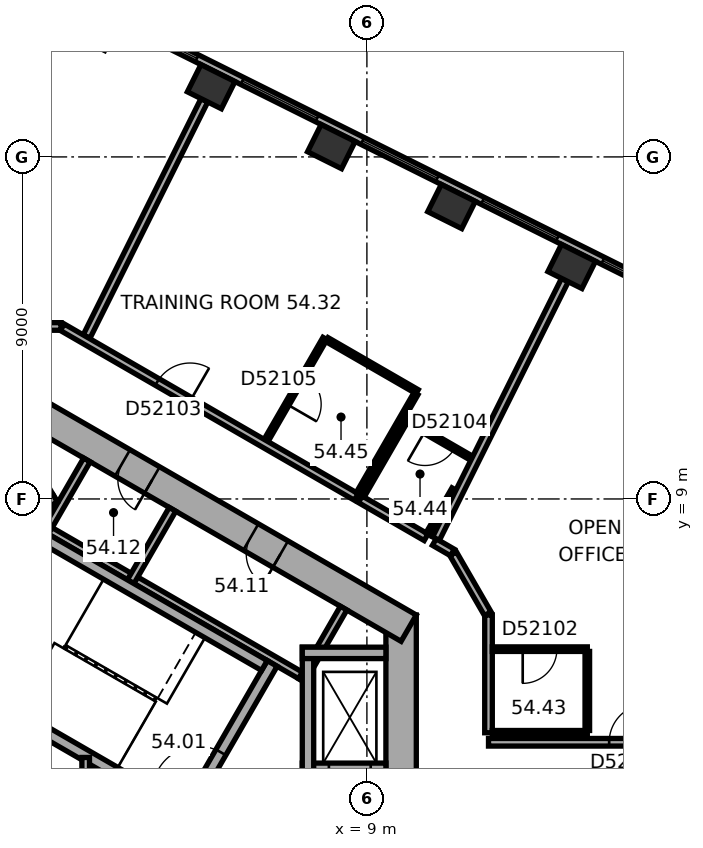
"""IFC4 building model, lengths in metres.
Left out: names, types, materials, properties, quantities, classifications, styles, units other than length and angle.
Written with IfcOpenShell. Run it as: python <this file> out.ifc"""

import sys

from ifc_helpers import new_model, si_unit, direction, frame, frame_2d, origin, origin_2d, place, context, subcontext, project, spatial, rectangle, extrude, element, fill, save


model = new_model("IFC4")
c1 = context("Model", 3, precision=1e-05, world=origin(), true_north=direction((0.0, 1.0)))
c2 = subcontext(c1, "Body", "Model", "MODEL_VIEW")
j1 = project(units=[si_unit("LENGTHUNIT", "METRE"), si_unit("PLANEANGLEUNIT", "RADIAN")], contexts=[c1])
p1 = place(None, origin())
s1 = spatial("IfcSite", under=j1, at=p1, CompositionType="ELEMENT")
p2 = place(p1, origin())
s2 = spatial("IfcBuilding", under=s1, at=p2, CompositionType="ELEMENT")
p3 = place(p2, frame((0.0, 0.0, 221.7)))
s3 = spatial("IfcBuildingStorey", under=s2, at=p3, CompositionType="ELEMENT", Elevation=221.7)
for number, where, z_axis, x_axis in (
    (1, (14.389, 15.118, 0.0), (0.0, 0.0, 1.0), (-0.895, 0.446, 0.0)),
    (2, (11.227, 16.695, 0.0), (0.0, 0.0, 1.0), (-0.895, 0.446, 0.0)),
    (3, (8.064, 18.271, 0.0), (0.0, 0.0, 1.0), (-0.895, 0.446, 0.0)),
    (4, (4.902, 19.848, 0.0), (0.0, 0.0, 1.0), (-0.895, 0.446, 0.0)),
):
    element("IfcColumn", number, at=place(p3, frame(where, z_axis=z_axis, x_axis=x_axis)), inside=s3, PredefinedType="COLUMN", context=c2, shape_type="SweptSolid", body=[
        extrude(rectangle(XDim=1.0, YDim=0.8, at=origin_2d()), origin(), (0.0, 0.0, 1.0), 3.7),
    ])
p4 = place(p3, frame((9.9, -5.947, 0.0), z_axis=(0.0, 0.0, 1.0), x_axis=(0.0, 1.0, 0.0)))
e5 = element("IfcWall", 5, at=p4, inside=s3, PredefinedType="SHEAR", context=c2, shape_type="SweptSolid", body=[
    extrude(rectangle(XDim=11.894, YDim=0.8, at=frame_2d((5.947, 0.0))), origin(), (0.0, 0.0, 1.0), 3.7),
])
p5 = place(p4, frame((6.147, 0.0, 0.0)))
e6 = element("IfcOpeningElement", 6, at=p5, cuts=e5, PredefinedType="OPENING", context=c2, shape_type="SweptSolid", body=[
    extrude(rectangle(XDim=1.5, YDim=2.1, at=frame_2d((0.75, 1.05))), frame((0.0, 0.41, 0.0), z_axis=(0.0, -1.0, 0.0), x_axis=(1.0, 0.0, 0.0)), (0.0, 0.0, 1.0), 0.82),
])
p6 = place(p4, frame((2.997, 0.0, 0.0)))
e7 = element("IfcOpeningElement", 7, at=p6, cuts=e5, PredefinedType="OPENING", context=c2, shape_type="SweptSolid", body=[
    extrude(rectangle(XDim=0.9, YDim=2.1, at=frame_2d((0.45, 1.05))), frame((0.0, 0.41, 0.0), z_axis=(0.0, -1.0, 0.0), x_axis=(1.0, 0.0, 0.0)), (0.0, 0.0, 1.0), 0.82),
])
p7 = place(p3, frame((10.1, 5.6, 0.0), z_axis=(0.0, 0.0, 1.0), x_axis=(-0.866023897231, 0.500002609418, 0.0)))
e8 = element("IfcWall", 8, at=p7, inside=s3, PredefinedType="SHEAR", context=c2, shape_type="SweptSolid", body=[
    extrude(rectangle(XDim=11.894, YDim=0.8, at=frame_2d((5.947, 0.0))), origin(), (0.0, 0.0, 1.0), 3.7),
])
p8 = place(p7, frame((3.897, 0.0, 0.0)))
e9 = element("IfcOpeningElement", 9, at=p8, cuts=e8, PredefinedType="OPENING", context=c2, shape_type="SweptSolid", body=[
    extrude(rectangle(XDim=0.9, YDim=2.1, at=frame_2d((0.45, 1.05))), frame((0.0, 0.41, 0.0), z_axis=(0.0, -1.0, 0.0), x_axis=(1.0, 0.0, 0.0)), (0.0, 0.0, 1.0), 0.82),
])
p9 = place(p7, frame((7.797, 0.0, 0.0)))
e10 = element("IfcOpeningElement", 10, at=p9, cuts=e8, PredefinedType="OPENING", context=c2, shape_type="SweptSolid", body=[
    extrude(rectangle(XDim=0.9, YDim=2.1, at=frame_2d((0.45, 1.05))), frame((0.0, 0.41, 0.0), z_axis=(0.0, -1.0, 0.0), x_axis=(1.0, 0.0, 0.0)), (0.0, 0.0, 1.0), 0.82),
])
p10 = place(p3, frame((18.299, 13.727, 0.0), z_axis=(0.0, 0.0, 1.0), x_axis=(-0.894934554817, 0.44619742558, 0.0)))
e11 = element("IfcWall", 11, at=p10, inside=s3, PredefinedType="STANDARD", context=c2, shape_type="SweptSolid", body=[
    extrude(rectangle(XDim=18.841, YDim=0.2, at=frame_2d((9.421, 0.0))), origin(), (0.0, 0.0, 1.0), 3.7),
])
p11 = place(p10, frame((1.253, 0.0, 0.9)))
e12 = element("IfcOpeningElement", 12, at=p11, cuts=e11, PredefinedType="OPENING", context=c2, shape_type="SweptSolid", body=[
    extrude(rectangle(XDim=2.2, YDim=2.0, at=frame_2d((1.1, 1.0))), frame((0.0, 0.11, 0.0), z_axis=(0.0, -1.0, 0.0), x_axis=(1.0, 0.0, 0.0)), (0.0, 0.0, 1.0), 0.22),
])
p12 = place(p10, frame((4.786, 0.0, 0.9)))
e13 = element("IfcOpeningElement", 13, at=p12, cuts=e11, PredefinedType="OPENING", context=c2, shape_type="SweptSolid", body=[
    extrude(rectangle(XDim=2.2, YDim=2.0, at=frame_2d((1.1, 1.0))), frame((0.0, 0.11, 0.0), z_axis=(0.0, -1.0, 0.0), x_axis=(1.0, 0.0, 0.0)), (0.0, 0.0, 1.0), 0.22),
])
p13 = place(p10, frame((8.32, 0.0, 0.9)))
e14 = element("IfcOpeningElement", 14, at=p13, cuts=e11, PredefinedType="OPENING", context=c2, shape_type="SweptSolid", body=[
    extrude(rectangle(XDim=2.2, YDim=2.0, at=frame_2d((1.1, 1.0))), frame((0.0, 0.11, 0.0), z_axis=(0.0, -1.0, 0.0), x_axis=(1.0, 0.0, 0.0)), (0.0, 0.0, 1.0), 0.22),
])
p14 = place(p10, frame((11.854, 0.0, 0.9)))
e15 = element("IfcOpeningElement", 15, at=p14, cuts=e11, PredefinedType="OPENING", context=c2, shape_type="SweptSolid", body=[
    extrude(rectangle(XDim=2.2, YDim=2.0, at=frame_2d((1.1, 1.0))), frame((0.0, 0.11, 0.0), z_axis=(0.0, -1.0, 0.0), x_axis=(1.0, 0.0, 0.0)), (0.0, 0.0, 1.0), 0.22),
])
p15 = place(p10, frame((15.387, 0.0, 0.9)))
e16 = element("IfcOpeningElement", 16, at=p15, cuts=e11, PredefinedType="OPENING", context=c2, shape_type="SweptSolid", body=[
    extrude(rectangle(XDim=2.2, YDim=2.0, at=frame_2d((1.1, 1.0))), frame((0.0, 0.11, 0.0), z_axis=(0.0, -1.0, 0.0), x_axis=(1.0, 0.0, 0.0)), (0.0, 0.0, 1.0), 0.22),
])
p16 = place(p3, frame((7.424, 4.259, 0.0), z_axis=(0.0, 0.0, 1.0), x_axis=(-0.866026010844, 0.49999894854, 0.0)))
e17 = element("IfcWall", 17, at=p16, inside=s3, PredefinedType="PARTITIONING", context=c2, shape_type="SweptSolid", body=[
    extrude(rectangle(XDim=8.0, YDim=0.2, at=frame_2d((4.0, 0.0))), origin(), (0.0, 0.0, 1.0), 3.42),
])
for number, where, z_axis, x_axis in (
    (18, (7.287, 4.222, 0.0), (0.0, 0.0, 1.0), (0.5, 0.866, 0.0)),
    (19, (2.784, 6.822, 0.0), (0.0, 0.0, 1.0), (0.5, 0.866, 0.0)),
    (20, (0.532, 8.122, 0.0), (0.0, 0.0, 1.0), (0.5, 0.866, 0.0)),
):
    element("IfcWall", number, at=place(p3, frame(where, z_axis=z_axis, x_axis=x_axis)), inside=s3, PredefinedType="PARTITIONING", context=c2, shape_type="SweptSolid", body=[
        extrude(rectangle(XDim=2.2, YDim=0.2, at=frame_2d((1.1, 0.0))), origin(), (0.0, 0.0, 1.0), 3.42),
    ])
p17 = place(p3, frame((0.803, 9.009, 0.0), z_axis=(0.0, 0.0, 1.0), x_axis=(-0.866028230842, -0.499995103361, 0.0)))
e21 = element("IfcWall", 21, at=p17, inside=s3, PredefinedType="PARTITIONING", context=c2, shape_type="SweptSolid", body=[
    extrude(rectangle(XDim=5.4, YDim=0.2, at=frame_2d((2.7, 0.0))), origin(), (0.0, 0.0, 1.0), 3.42),
])
p18 = place(p3, frame((0.767, 8.872, 0.0), z_axis=(0.0, 0.0, 1.0), x_axis=(-0.499994660107, 0.866028486751, 0.0)))
e22 = element("IfcWall", 22, at=p18, inside=s3, PredefinedType="PARTITIONING", context=c2, shape_type="SweptSolid", body=[
    extrude(rectangle(XDim=2.2, YDim=0.2, at=frame_2d((1.1, 0.0))), origin(), (0.0, 0.0, 1.0), 3.42),
])
p19 = place(p3, frame((4.158, 0.602, 0.0), z_axis=(0.0, 0.0, 1.0), x_axis=(0.499977259774, 0.866038532462, 0.0)))
e23 = element("IfcWall", 23, at=p19, inside=s3, PredefinedType="SHEAR", context=c2, shape_type="SweptSolid", body=[
    extrude(rectangle(XDim=4.7, YDim=0.3, at=frame_2d((2.35, 0.0))), origin(), (0.0, 0.0, 1.0), 3.42),
])
p20 = place(p19, frame((0.8, 0.0, 0.0)))
e24 = element("IfcOpeningElement", 24, at=p20, cuts=e23, PredefinedType="OPENING", context=c2, shape_type="SweptSolid", body=[
    extrude(rectangle(XDim=1.2, YDim=2.1, at=frame_2d((0.6, 1.05))), frame((0.0, 0.16, 0.0), z_axis=(0.0, -1.0, 0.0), x_axis=(1.0, 0.0, 0.0)), (0.0, 0.0, 1.0), 0.32),
])
for number, where, z_axis, x_axis in (
    (25, (4.103, 0.807, 0.0), (0.0, 0.0, 1.0), (-0.866, 0.5, 0.0)),
    (26, (6.303, 4.617, 0.0), (0.0, 0.0, 1.0), (-0.866, 0.5, 0.0)),
):
    element("IfcWall", number, at=place(p3, frame(where, z_axis=z_axis, x_axis=x_axis)), inside=s3, PredefinedType="SHEAR", context=c2, shape_type="SweptSolid", body=[
        extrude(rectangle(XDim=7.06, YDim=0.3, at=frame_2d((3.53, 0.0))), origin(), (0.0, 0.0, 1.0), 3.42),
    ])
p21 = place(p3, frame((7.3, 1.9, 0.0), z_axis=(0.0, 0.0, 1.0), x_axis=(1.0, 0.0, 0.0)))
e27 = element("IfcWall", 27, at=p21, inside=s3, PredefinedType="SHEAR", context=c2, shape_type="SweptSolid", body=[
    extrude(rectangle(XDim=2.2, YDim=0.3, at=frame_2d((1.1, 0.0))), origin(), (0.0, 0.0, 1.0), 3.42),
])
p22 = place(p21, frame((0.7, 0.0, 0.0)))
e28 = element("IfcOpeningElement", 28, at=p22, cuts=e27, PredefinedType="OPENING", context=c2, shape_type="SweptSolid", body=[
    extrude(rectangle(XDim=1.1, YDim=2.1, at=frame_2d((0.55, 1.05))), frame((0.0, 0.16, 0.0), z_axis=(0.0, -1.0, 0.0), x_axis=(1.0, 0.0, 0.0)), (0.0, 0.0, 1.0), 0.32),
])
p23 = place(p3, frame((7.45, 1.75, 0.0), z_axis=(0.0, 0.0, 1.0), x_axis=(0.0, 1.0, 0.0)))
e29 = element("IfcWall", 29, at=p23, inside=s3, PredefinedType="SHEAR", context=c2, shape_type="SweptSolid", body=[
    extrude(rectangle(XDim=3.35, YDim=0.3, at=frame_2d((1.675, 0.0))), origin(), (0.0, 0.0, 1.0), 3.42),
])
p24 = place(p3, frame((7.3, 4.95, 0.0), z_axis=(0.0, 0.0, 1.0), x_axis=(1.0, 0.0, 0.0)))
e30 = element("IfcWall", 30, at=p24, inside=s3, PredefinedType="SHEAR", context=c2, shape_type="SweptSolid", body=[
    extrude(rectangle(XDim=2.2, YDim=0.3, at=frame_2d((1.1, 0.0))), origin(), (0.0, 0.0, 1.0), 3.42),
])
p25 = place(p3, frame((1.6, -2.198, 0.0), z_axis=(0.0, 0.0, 1.0), x_axis=(0.0, 1.0, 0.0)))
e31 = element("IfcWall", 31, at=p25, inside=s3, PredefinedType="PARTITIONING", context=c2, shape_type="SweptSolid", body=[
    extrude(rectangle(XDim=4.397, YDim=0.2, at=frame_2d((2.198, 0.0))), origin(), (0.0, 0.0, 1.0), 3.42),
])
p26 = place(p3, frame((0.95, 13.539, 0.0), z_axis=(0.0, 0.0, 1.0), x_axis=(-1.0, 0.0, 0.0)))
e32 = element("IfcWall", 32, at=p26, inside=s3, PredefinedType="PARTITIONING", context=c2, shape_type="SweptSolid", body=[
    extrude(rectangle(XDim=1.9, YDim=0.2, at=frame_2d((0.95, 0.0))), origin(), (0.0, 0.0, 1.0), 3.42),
])
p27 = place(p3, frame((4.723, 19.49, 0.0), z_axis=(0.0, 0.0, 1.0), x_axis=(-0.446186614574, -0.894939944898, 0.0)))
e33 = element("IfcWall", 33, at=p27, inside=s3, PredefinedType="PARTITIONING", context=c2, shape_type="SweptSolid", body=[
    extrude(rectangle(XDim=6.944, YDim=0.2, at=frame_2d((3.472, 0.0))), origin(), (0.0, 0.0, 1.0), 2.87),
])
p28 = place(p3, frame((6.347, 10.539, 0.0), z_axis=(0.0, 0.0, 1.0), x_axis=(0.499933790963, 0.866063626216, 0.0)))
e34 = element("IfcWall", 34, at=p28, inside=s3, PredefinedType="PARTITIONING", context=c2, shape_type="SweptSolid", body=[
    extrude(rectangle(XDim=3.1, YDim=0.12, at=frame_2d((1.55, 0.0))), origin(), (0.0, 0.0, 1.0), 3.42),
])
p29 = place(p28, frame((1.1, 0.0, 0.0)))
e35 = element("IfcOpeningElement", 35, at=p29, cuts=e34, PredefinedType="OPENING", context=c2, shape_type="SweptSolid", body=[
    extrude(rectangle(XDim=0.9, YDim=2.1, at=frame_2d((0.45, 1.05))), frame((0.0, 0.07, 0.0), z_axis=(0.0, -1.0, 0.0), x_axis=(1.0, 0.0, 0.0)), (0.0, 0.0, 1.0), 0.14),
])
p30 = place(p3, frame((7.948, 13.193, 0.0), z_axis=(0.0, 0.0, 1.0), x_axis=(0.866019409031, -0.500010383074, 0.0)))
e36 = element("IfcWall", 36, at=p30, inside=s3, PredefinedType="PARTITIONING", context=c2, shape_type="SweptSolid", body=[
    extrude(rectangle(XDim=2.74, YDim=0.12, at=frame_2d((1.37, 0.0))), origin(), (0.0, 0.0, 1.0), 3.42),
])
p31 = place(p3, frame((8.721, 9.052, 0.0), z_axis=(0.0, 0.0, 1.0), x_axis=(-0.866028125821, 0.499995285264, 0.0)))
e37 = element("IfcWall", 37, at=p31, inside=s3, PredefinedType="PARTITIONING", context=c2, shape_type="SweptSolid", body=[
    extrude(rectangle(XDim=8.934, YDim=0.2, at=frame_2d((4.467, 0.0))), origin(), (0.0, 0.0, 1.0), 3.42),
])
p32 = place(p31, frame((5.05, 0.0, 0.0)))
e38 = element("IfcOpeningElement", 38, at=p32, cuts=e37, PredefinedType="OPENING", context=c2, shape_type="SweptSolid", body=[
    extrude(rectangle(XDim=1.0, YDim=2.1, at=frame_2d((0.5, 1.05))), frame((0.0, 0.11, 0.0), z_axis=(0.0, -1.0, 0.0), x_axis=(1.0, 0.0, 0.0)), (0.0, 0.0, 1.0), 0.22),
])
p33 = place(p3, frame((8.875, 9.079, 0.0), z_axis=(0.0, 0.0, 1.0), x_axis=(0.499998129301, 0.86602648383, 0.0)))
e39 = element("IfcWall", 39, at=p33, inside=s3, PredefinedType="PARTITIONING", context=c2, shape_type="SweptSolid", body=[
    extrude(rectangle(XDim=2.3, YDim=0.12, at=frame_2d((1.15, 0.0))), origin(), (0.0, 0.0, 1.0), 3.42),
])
p34 = place(p3, frame((10.077, 11.04, 0.0), z_axis=(0.0, 0.0, 1.0), x_axis=(0.866043088465, -0.499969367985, 0.0)))
e40 = element("IfcWall", 40, at=p34, inside=s3, PredefinedType="PARTITIONING", context=c2, shape_type="SweptSolid", body=[
    extrude(rectangle(XDim=1.94, YDim=0.12, at=frame_2d((0.97, 0.0))), origin(), (0.0, 0.0, 1.0), 3.42),
])
p35 = place(p34, frame((0.52, 0.0, 0.0)))
e41 = element("IfcOpeningElement", 41, at=p35, cuts=e40, PredefinedType="OPENING", context=c2, shape_type="SweptSolid", body=[
    extrude(rectangle(XDim=0.9, YDim=2.1, at=frame_2d((0.45, 1.05))), frame((0.0, 0.07, 0.0), z_axis=(0.0, -1.0, 0.0), x_axis=(1.0, 0.0, 0.0)), (0.0, 0.0, 1.0), 0.14),
])
p36 = place(p3, frame((10.292, 11.771, 0.0), z_axis=(0.0, 0.0, 1.0), x_axis=(-0.500026023896, -0.86601037836, 0.0)))
e42 = element("IfcWall", 42, at=p36, inside=s3, PredefinedType="PARTITIONING", context=c2, shape_type="SweptSolid", body=[
    extrude(rectangle(XDim=3.04, YDim=0.12, at=frame_2d((1.52, 0.0))), origin(), (0.0, 0.0, 1.0), 3.42),
])
p37 = place(p3, frame((10.558, 7.992, 0.0), z_axis=(0.0, 0.0, 1.0), x_axis=(-0.866041268327, 0.499972520799, 0.0)))
e43 = element("IfcWall", 43, at=p37, inside=s3, PredefinedType="PARTITIONING", context=c2, shape_type="SweptSolid", body=[
    extrude(rectangle(XDim=2.0, YDim=0.2, at=frame_2d((1.0, 0.0))), origin(), (0.0, 0.0, 1.0), 3.42),
])
p38 = place(p3, frame((11.25, 7.592, 0.0), z_axis=(0.0, 0.0, 1.0), x_axis=(-0.865993292597, 0.500055614084, 0.0)))
e44 = element("IfcWall", 44, at=p38, inside=s3, PredefinedType="PARTITIONING", context=c2, shape_type="SweptSolid", body=[
    extrude(rectangle(XDim=0.55, YDim=0.2, at=frame_2d((0.275, 0.0))), origin(), (0.0, 0.0, 1.0), 3.42),
])
p39 = place(p3, frame((11.291, 9.263, 0.0), z_axis=(0.0, 0.0, 1.0), x_axis=(-0.500036664704, -0.866004234373, 0.0)))
e45 = element("IfcWall", 45, at=p39, inside=s3, PredefinedType="PARTITIONING", context=c2, shape_type="SweptSolid", body=[
    extrude(rectangle(XDim=1.368, YDim=0.12, at=frame_2d((0.684, 0.0))), origin(), (0.0, 0.0, 1.0), 3.42),
])
p40 = place(p3, frame((12.18, 5.981, 0.0), z_axis=(0.0, 0.0, 1.0), x_axis=(-0.499904359745, 0.86608061467, 0.0)))
e46 = element("IfcWall", 46, at=p40, inside=s3, PredefinedType="PARTITIONING", context=c2, shape_type="SweptSolid", body=[
    extrude(rectangle(XDim=1.82, YDim=0.2, at=frame_2d((0.91, 0.0))), origin(), (0.0, 0.0, 1.0), 3.42),
])
p41 = place(p3, frame((12.2, 2.848, 0.0), z_axis=(0.0, 0.0, 1.0), x_axis=(0.0, 1.0, 0.0)))
e47 = element("IfcWall", 47, at=p41, inside=s3, PredefinedType="PARTITIONING", context=c2, shape_type="SweptSolid", body=[
    extrude(rectangle(XDim=3.099, YDim=0.2, at=frame_2d((1.549, 0.0))), origin(), (0.0, 0.0, 1.0), 3.42),
])
p42 = place(p3, frame((12.3, 5.048, 0.0), z_axis=(0.0, 0.0, 1.0), x_axis=(1.0, 0.0, 0.0)))
e48 = element("IfcWall", 48, at=p42, inside=s3, PredefinedType="PARTITIONING", context=c2, shape_type="SweptSolid", body=[
    extrude(rectangle(XDim=2.5, YDim=0.12, at=frame_2d((1.25, 0.0))), origin(), (0.0, 0.0, 1.0), 3.42),
])
p43 = place(p42, frame((0.8, 0.0, 0.0)))
e49 = element("IfcOpeningElement", 49, at=p43, cuts=e48, PredefinedType="OPENING", context=c2, shape_type="SweptSolid", body=[
    extrude(rectangle(XDim=0.9, YDim=2.1, at=frame_2d((0.45, 1.05))), frame((0.0, 0.07, 0.0), z_axis=(0.0, -1.0, 0.0), x_axis=(1.0, 0.0, 0.0)), (0.0, 0.0, 1.0), 0.14),
])
p44 = place(p3, frame((14.211, 14.76, 0.0), z_axis=(0.0, 0.0, 1.0), x_axis=(-0.446198490295, -0.89493402397, 0.0)))
e50 = element("IfcWall", 50, at=p44, inside=s3, PredefinedType="PARTITIONING", context=c2, shape_type="SweptSolid", body=[
    extrude(rectangle(XDim=7.602, YDim=0.2, at=frame_2d((3.801, 0.0))), origin(), (0.0, 0.0, 1.0), 3.42),
])
p45 = place(p3, frame((14.8, 2.848, 0.0), z_axis=(0.0, 0.0, 1.0), x_axis=(-1.0, 0.0, 0.0)))
e51 = element("IfcWall", 51, at=p45, inside=s3, PredefinedType="PARTITIONING", context=c2, shape_type="SweptSolid", body=[
    extrude(rectangle(XDim=2.5, YDim=0.12, at=frame_2d((1.25, 0.0))), origin(), (0.0, 0.0, 1.0), 3.42),
])
p46 = place(p3, frame((14.8, 4.988, 0.0), z_axis=(0.0, 0.0, 1.0), x_axis=(0.0, -1.0, 0.0)))
e52 = element("IfcWall", 52, at=p46, inside=s3, PredefinedType="PARTITIONING", context=c2, shape_type="SweptSolid", body=[
    extrude(rectangle(XDim=2.08, YDim=0.12, at=frame_2d((1.04, 0.0))), origin(), (0.0, 0.0, 1.0), 3.42),
])
p47 = place(p3, frame((19.55, 2.598, 0.0), z_axis=(0.0, 0.0, 1.0), x_axis=(-1.0, 0.0, 0.0)))
e53 = element("IfcWall", 53, at=p47, inside=s3, PredefinedType="PARTITIONING", context=c2, shape_type="SweptSolid", body=[
    extrude(rectangle(XDim=7.35, YDim=0.2, at=frame_2d((3.675, 0.0))), origin(), (0.0, 0.0, 1.0), 3.42),
])
p48 = place(p47, frame((3.175, 0.0, 0.0)))
e54 = element("IfcOpeningElement", 54, at=p48, cuts=e53, PredefinedType="OPENING", context=c2, shape_type="SweptSolid", body=[
    extrude(rectangle(XDim=1.0, YDim=2.1, at=frame_2d((0.5, 1.05))), frame((0.0, 0.11, 0.0), z_axis=(0.0, -1.0, 0.0), x_axis=(1.0, 0.0, 0.0)), (0.0, 0.0, 1.0), 0.22),
])
p49 = place(p11, origin())
e55 = element("IfcWindow", 55, at=p49, inside=s3, PartitioningType="SINGLE_PANEL", PredefinedType="WINDOW", context=c2, shape_type="SweptSolid", body=[
    extrude(rectangle(XDim=2.2, YDim=2.0, at=frame_2d((1.1, 1.0))), frame((0.0, 0.03, 0.0), z_axis=(0.0, -1.0, 0.0), x_axis=(1.0, 0.0, 0.0)), (0.0, 0.0, 1.0), 0.06),
])
fill(e12, e55)
p50 = place(p12, origin())
e56 = element("IfcWindow", 56, at=p50, inside=s3, PartitioningType="SINGLE_PANEL", PredefinedType="WINDOW", context=c2, shape_type="SweptSolid", body=[
    extrude(rectangle(XDim=2.2, YDim=2.0, at=frame_2d((1.1, 1.0))), frame((0.0, 0.03, 0.0), z_axis=(0.0, -1.0, 0.0), x_axis=(1.0, 0.0, 0.0)), (0.0, 0.0, 1.0), 0.06),
])
fill(e13, e56)
p51 = place(p13, origin())
e57 = element("IfcWindow", 57, at=p51, inside=s3, PartitioningType="SINGLE_PANEL", PredefinedType="WINDOW", context=c2, shape_type="SweptSolid", body=[
    extrude(rectangle(XDim=2.2, YDim=2.0, at=frame_2d((1.1, 1.0))), frame((0.0, 0.03, 0.0), z_axis=(0.0, -1.0, 0.0), x_axis=(1.0, 0.0, 0.0)), (0.0, 0.0, 1.0), 0.06),
])
fill(e14, e57)
p52 = place(p14, origin())
e58 = element("IfcWindow", 58, at=p52, inside=s3, PartitioningType="SINGLE_PANEL", PredefinedType="WINDOW", context=c2, shape_type="SweptSolid", body=[
    extrude(rectangle(XDim=2.2, YDim=2.0, at=frame_2d((1.1, 1.0))), frame((0.0, 0.03, 0.0), z_axis=(0.0, -1.0, 0.0), x_axis=(1.0, 0.0, 0.0)), (0.0, 0.0, 1.0), 0.06),
])
fill(e15, e58)
p53 = place(p15, origin())
e59 = element("IfcWindow", 59, at=p53, inside=s3, PartitioningType="SINGLE_PANEL", PredefinedType="WINDOW", context=c2, shape_type="SweptSolid", body=[
    extrude(rectangle(XDim=2.2, YDim=2.0, at=frame_2d((1.1, 1.0))), frame((0.0, 0.03, 0.0), z_axis=(0.0, -1.0, 0.0), x_axis=(1.0, 0.0, 0.0)), (0.0, 0.0, 1.0), 0.06),
])
fill(e16, e59)
p54 = place(p20, origin())
e60 = element("IfcDoor", 60, at=p54, inside=s3, OperationType="SINGLE_SWING_RIGHT", PredefinedType="DOOR", context=c2, shape_type="SweptSolid", body=[
    extrude(rectangle(XDim=1.2, YDim=2.1, at=frame_2d((0.6, 1.05))), frame((0.0, 0.025, 0.0), z_axis=(0.0, -1.0, 0.0), x_axis=(1.0, 0.0, 0.0)), (0.0, 0.0, 1.0), 0.05),
])
fill(e24, e60)
p55 = place(p8, origin())
e61 = element("IfcDoor", 61, at=p55, inside=s3, OperationType="SINGLE_SWING_LEFT", PredefinedType="DOOR", context=c2, shape_type="SweptSolid", body=[
    extrude(rectangle(XDim=0.9, YDim=2.1, at=frame_2d((0.45, 1.05))), frame((0.0, 0.025, 0.0), z_axis=(0.0, -1.0, 0.0), x_axis=(1.0, 0.0, 0.0)), (0.0, 0.0, 1.0), 0.05),
])
fill(e9, e61)
p56 = place(p9, origin())
e62 = element("IfcDoor", 62, at=p56, inside=s3, OperationType="SINGLE_SWING_LEFT", PredefinedType="DOOR", context=c2, shape_type="SweptSolid", body=[
    extrude(rectangle(XDim=0.9, YDim=2.1, at=frame_2d((0.45, 1.05))), frame((0.0, 0.025, 0.0), z_axis=(0.0, -1.0, 0.0), x_axis=(1.0, 0.0, 0.0)), (0.0, 0.0, 1.0), 0.05),
])
fill(e10, e62)
p57 = place(p22, origin())
e63 = element("IfcDoor", 63, at=p57, inside=s3, OperationType="DOUBLE_DOOR_SLIDING", PredefinedType="DOOR", context=c2, shape_type="SweptSolid", body=[
    extrude(rectangle(XDim=1.1, YDim=2.1, at=frame_2d((0.55, 1.05))), frame((0.0, 0.025, 0.0), z_axis=(0.0, -1.0, 0.0), x_axis=(1.0, 0.0, 0.0)), (0.0, 0.0, 1.0), 0.05),
])
fill(e28, e63)
p58 = place(p48, origin())
e64 = element("IfcDoor", 64, at=p58, inside=s3, OperationType="SINGLE_SWING_LEFT", PredefinedType="DOOR", context=c2, shape_type="SweptSolid", body=[
    extrude(rectangle(XDim=1.0, YDim=2.1, at=frame_2d((0.5, 1.05))), frame((0.0, 0.025, 0.0), z_axis=(0.0, -1.0, 0.0), x_axis=(1.0, 0.0, 0.0)), (0.0, 0.0, 1.0), 0.05),
])
fill(e54, e64)
p59 = place(p43, origin())
e65 = element("IfcDoor", 65, at=p59, inside=s3, OperationType="SINGLE_SWING_LEFT", PredefinedType="DOOR", context=c2, shape_type="SweptSolid", body=[
    extrude(rectangle(XDim=0.9, YDim=2.1, at=frame_2d((0.45, 1.05))), frame((0.0, 0.025, 0.0), z_axis=(0.0, -1.0, 0.0), x_axis=(1.0, 0.0, 0.0)), (0.0, 0.0, 1.0), 0.05),
])
fill(e49, e65)
p60 = place(p32, origin())
e66 = element("IfcDoor", 66, at=p60, inside=s3, OperationType="SINGLE_SWING_LEFT", PredefinedType="DOOR", context=c2, shape_type="SweptSolid", body=[
    extrude(rectangle(XDim=1.0, YDim=2.1, at=frame_2d((0.5, 1.05))), frame((0.0, 0.025, 0.0), z_axis=(0.0, -1.0, 0.0), x_axis=(1.0, 0.0, 0.0)), (0.0, 0.0, 1.0), 0.05),
])
fill(e38, e66)
p61 = place(p35, origin())
e67 = element("IfcDoor", 67, at=p61, inside=s3, OperationType="SINGLE_SWING_LEFT", PredefinedType="DOOR", context=c2, shape_type="SweptSolid", body=[
    extrude(rectangle(XDim=0.9, YDim=2.1, at=frame_2d((0.45, 1.05))), frame((0.0, 0.025, 0.0), z_axis=(0.0, -1.0, 0.0), x_axis=(1.0, 0.0, 0.0)), (0.0, 0.0, 1.0), 0.05),
])
fill(e41, e67)
p62 = place(p29, origin())
e68 = element("IfcDoor", 68, at=p62, inside=s3, OperationType="SINGLE_SWING_LEFT", PredefinedType="DOOR", context=c2, shape_type="SweptSolid", body=[
    extrude(rectangle(XDim=0.9, YDim=2.1, at=frame_2d((0.45, 1.05))), frame((0.0, 0.025, 0.0), z_axis=(0.0, -1.0, 0.0), x_axis=(1.0, 0.0, 0.0)), (0.0, 0.0, 1.0), 0.05),
])
fill(e35, e68)
save(model, sys.argv[1])
